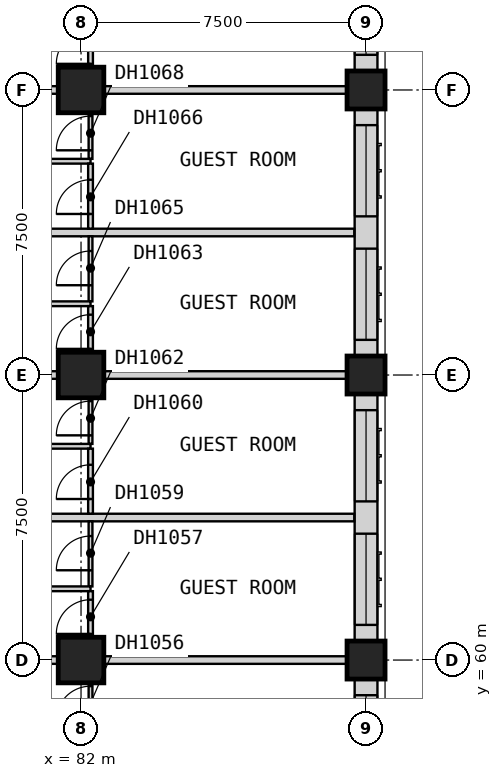
"""IFC4 building model, lengths in metres.
Left out: names, types, materials, properties, quantities, classifications, styles, units other than length and angle.
Written with IfcOpenShell. Run it as: python <this file> out.ifc"""

import sys

from ifc_helpers import new_model, si_unit, direction, frame, frame_2d, origin, origin_2d, place, context, subcontext, project, spatial, rectangle, extrude, element, fill, save


model = new_model("IFC4")
c1 = context("Model", 3, precision=1e-05, world=origin(), true_north=direction((0.0, 1.0)))
c2 = subcontext(c1, "Body", "Model", "MODEL_VIEW")
j1 = project(units=[si_unit("LENGTHUNIT", "METRE"), si_unit("PLANEANGLEUNIT", "RADIAN")], contexts=[c1])
p1 = place(None, origin())
s1 = spatial("IfcSite", under=j1, at=p1, CompositionType="ELEMENT")
p2 = place(p1, origin())
s2 = spatial("IfcBuilding", under=s1, at=p2, CompositionType="ELEMENT")
p3 = place(p2, frame((0.0, 0.0, 48.4)))
s3 = spatial("IfcBuildingStorey", under=s2, at=p3, CompositionType="ELEMENT", Elevation=48.4)
for number, where, z_axis, x_axis in (
    (1, (82.0, 60.0, 0.0), (0.0, 0.0, 1.0), (1.0, 0.0, 0.0)),
    (2, (82.0, 67.5, 0.0), (0.0, 0.0, 1.0), (1.0, 0.0, 0.0)),
    (3, (82.0, 75.0, 0.0), (0.0, 0.0, 1.0), (1.0, 0.0, 0.0)),
):
    element("IfcColumn", number, at=place(p3, frame(where, z_axis=z_axis, x_axis=x_axis)), inside=s3, PredefinedType="COLUMN", context=c2, shape_type="SweptSolid", body=[
        extrude(rectangle(XDim=1.2, YDim=1.2, at=origin_2d()), origin(), (0.0, 0.0, 1.0), 3.6),
    ])
for number, where, z_axis, x_axis in (
    (4, (89.5, 60.0, 0.0), (0.0, 0.0, 1.0), (1.0, 0.0, 0.0)),
    (5, (89.5, 67.5, 0.0), (0.0, 0.0, 1.0), (1.0, 0.0, 0.0)),
    (6, (89.5, 75.0, 0.0), (0.0, 0.0, 1.0), (1.0, 0.0, 0.0)),
):
    element("IfcColumn", number, at=place(p3, frame(where, z_axis=z_axis, x_axis=x_axis)), inside=s3, PredefinedType="COLUMN", context=c2, shape_type="SweptSolid", body=[
        extrude(rectangle(XDim=1.0, YDim=1.0, at=origin_2d()), origin(), (0.0, 0.0, 1.0), 3.6),
    ])
p4 = place(p3, frame((89.5, 53.0, 0.0), z_axis=(0.0, 0.0, 1.0), x_axis=(0.0, 1.0, 0.0)))
e7 = element("IfcWall", 7, at=p4, inside=s3, PredefinedType="SOLIDWALL", context=c2, shape_type="SweptSolid", body=[
    extrude(rectangle(XDim=6.5, YDim=0.6, at=frame_2d((3.25, 0.0))), origin(), (0.0, 0.0, 1.0), 2.85),
])
p5 = place(p4, frame((0.425, 0.0, 0.8)))
e8 = element("IfcOpeningElement", 8, at=p5, cuts=e7, PredefinedType="OPENING", context=c2, shape_type="SweptSolid", body=[
    extrude(rectangle(XDim=2.4, YDim=1.8, at=frame_2d((1.2, 0.9))), frame((0.0, 0.31, 0.0), z_axis=(0.0, -1.0, 0.0), x_axis=(1.0, 0.0, 0.0)), (0.0, 0.0, 1.0), 0.62),
])
p6 = place(p4, frame((3.675, 0.0, 0.8)))
e9 = element("IfcOpeningElement", 9, at=p6, cuts=e7, PredefinedType="OPENING", context=c2, shape_type="SweptSolid", body=[
    extrude(rectangle(XDim=2.4, YDim=1.8, at=frame_2d((1.2, 0.9))), frame((0.0, 0.31, 0.0), z_axis=(0.0, -1.0, 0.0), x_axis=(1.0, 0.0, 0.0)), (0.0, 0.0, 1.0), 0.62),
])
p7 = place(p3, frame((89.5, 60.5, 0.0), z_axis=(0.0, 0.0, 1.0), x_axis=(0.0, 1.0, 0.0)))
e10 = element("IfcWall", 10, at=p7, inside=s3, PredefinedType="SOLIDWALL", context=c2, shape_type="SweptSolid", body=[
    extrude(rectangle(XDim=6.5, YDim=0.6, at=frame_2d((3.25, 0.0))), origin(), (0.0, 0.0, 1.0), 2.85),
])
p8 = place(p7, frame((0.425, 0.0, 0.8)))
e11 = element("IfcOpeningElement", 11, at=p8, cuts=e10, PredefinedType="OPENING", context=c2, shape_type="SweptSolid", body=[
    extrude(rectangle(XDim=2.4, YDim=1.8, at=frame_2d((1.2, 0.9))), frame((0.0, 0.31, 0.0), z_axis=(0.0, -1.0, 0.0), x_axis=(1.0, 0.0, 0.0)), (0.0, 0.0, 1.0), 0.62),
])
p9 = place(p7, frame((3.675, 0.0, 0.8)))
e12 = element("IfcOpeningElement", 12, at=p9, cuts=e10, PredefinedType="OPENING", context=c2, shape_type="SweptSolid", body=[
    extrude(rectangle(XDim=2.4, YDim=1.8, at=frame_2d((1.2, 0.9))), frame((0.0, 0.31, 0.0), z_axis=(0.0, -1.0, 0.0), x_axis=(1.0, 0.0, 0.0)), (0.0, 0.0, 1.0), 0.62),
])
p10 = place(p3, frame((89.5, 68.0, 0.0), z_axis=(0.0, 0.0, 1.0), x_axis=(0.0, 1.0, 0.0)))
e13 = element("IfcWall", 13, at=p10, inside=s3, PredefinedType="SOLIDWALL", context=c2, shape_type="SweptSolid", body=[
    extrude(rectangle(XDim=6.5, YDim=0.6, at=frame_2d((3.25, 0.0))), origin(), (0.0, 0.0, 1.0), 2.85),
])
p11 = place(p10, frame((0.425, 0.0, 0.8)))
e14 = element("IfcOpeningElement", 14, at=p11, cuts=e13, PredefinedType="OPENING", context=c2, shape_type="SweptSolid", body=[
    extrude(rectangle(XDim=2.4, YDim=1.8, at=frame_2d((1.2, 0.9))), frame((0.0, 0.31, 0.0), z_axis=(0.0, -1.0, 0.0), x_axis=(1.0, 0.0, 0.0)), (0.0, 0.0, 1.0), 0.62),
])
p12 = place(p10, frame((3.675, 0.0, 0.8)))
e15 = element("IfcOpeningElement", 15, at=p12, cuts=e13, PredefinedType="OPENING", context=c2, shape_type="SweptSolid", body=[
    extrude(rectangle(XDim=2.4, YDim=1.8, at=frame_2d((1.2, 0.9))), frame((0.0, 0.31, 0.0), z_axis=(0.0, -1.0, 0.0), x_axis=(1.0, 0.0, 0.0)), (0.0, 0.0, 1.0), 0.62),
])
p13 = place(p3, frame((89.5, 75.5, 0.0), z_axis=(0.0, 0.0, 1.0), x_axis=(0.0, 1.0, 0.0)))
e16 = element("IfcWall", 16, at=p13, inside=s3, PredefinedType="SOLIDWALL", context=c2, shape_type="SweptSolid", body=[
    extrude(rectangle(XDim=6.5, YDim=0.6, at=frame_2d((3.25, 0.0))), origin(), (0.0, 0.0, 1.0), 2.85),
])
p14 = place(p13, frame((0.425, 0.0, 0.8)))
e17 = element("IfcOpeningElement", 17, at=p14, cuts=e16, PredefinedType="OPENING", context=c2, shape_type="SweptSolid", body=[
    extrude(rectangle(XDim=2.4, YDim=1.8, at=frame_2d((1.2, 0.9))), frame((0.0, 0.31, 0.0), z_axis=(0.0, -1.0, 0.0), x_axis=(1.0, 0.0, 0.0)), (0.0, 0.0, 1.0), 0.62),
])
p15 = place(p13, frame((3.675, 0.0, 0.8)))
e18 = element("IfcOpeningElement", 18, at=p15, cuts=e16, PredefinedType="OPENING", context=c2, shape_type="SweptSolid", body=[
    extrude(rectangle(XDim=2.4, YDim=1.8, at=frame_2d((1.2, 0.9))), frame((0.0, 0.31, 0.0), z_axis=(0.0, -1.0, 0.0), x_axis=(1.0, 0.0, 0.0)), (0.0, 0.0, 1.0), 0.62),
])
p16 = place(p3, frame((77.475, 60.0, 0.0), z_axis=(0.0, 0.0, 1.0), x_axis=(1.0, 0.0, 0.0)))
e19 = element("IfcWall", 19, at=p16, inside=s3, PredefinedType="PARTITIONING", context=c2, shape_type="SweptSolid", body=[
    extrude(rectangle(XDim=12.525, YDim=0.2, at=frame_2d((6.262, 0.0))), origin(), (0.0, 0.0, 1.0), 3.35),
])
p17 = place(p3, frame((77.475, 63.75, 0.0), z_axis=(0.0, 0.0, 1.0), x_axis=(1.0, 0.0, 0.0)))
e20 = element("IfcWall", 20, at=p17, inside=s3, PredefinedType="PARTITIONING", context=c2, shape_type="SweptSolid", body=[
    extrude(rectangle(XDim=11.715, YDim=0.2, at=frame_2d((5.857, 0.0))), origin(), (0.0, 0.0, 1.0), 3.35),
])
p18 = place(p3, frame((77.475, 67.5, 0.0), z_axis=(0.0, 0.0, 1.0), x_axis=(1.0, 0.0, 0.0)))
e21 = element("IfcWall", 21, at=p18, inside=s3, PredefinedType="PARTITIONING", context=c2, shape_type="SweptSolid", body=[
    extrude(rectangle(XDim=12.525, YDim=0.2, at=frame_2d((6.262, 0.0))), origin(), (0.0, 0.0, 1.0), 3.35),
])
p19 = place(p3, frame((77.475, 71.25, 0.0), z_axis=(0.0, 0.0, 1.0), x_axis=(1.0, 0.0, 0.0)))
e22 = element("IfcWall", 22, at=p19, inside=s3, PredefinedType="PARTITIONING", context=c2, shape_type="SweptSolid", body=[
    extrude(rectangle(XDim=11.715, YDim=0.2, at=frame_2d((5.857, 0.0))), origin(), (0.0, 0.0, 1.0), 3.35),
])
p20 = place(p3, frame((77.475, 75.0, 0.0), z_axis=(0.0, 0.0, 1.0), x_axis=(1.0, 0.0, 0.0)))
e23 = element("IfcWall", 23, at=p20, inside=s3, PredefinedType="PARTITIONING", context=c2, shape_type="SweptSolid", body=[
    extrude(rectangle(XDim=12.525, YDim=0.2, at=frame_2d((6.262, 0.0))), origin(), (0.0, 0.0, 1.0), 3.35),
])
p21 = place(p3, frame((82.25, 58.188, 0.0), z_axis=(0.0, 0.0, 1.0), x_axis=(0.0, 1.0, 0.0)))
e24 = element("IfcWall", 24, at=p21, inside=s3, PredefinedType="PARTITIONING", context=c2, shape_type="SweptSolid", body=[
    extrude(rectangle(XDim=1.712, YDim=0.1, at=frame_2d((0.856, 0.0))), origin(), (0.0, 0.0, 1.0), 3.35),
])
p22 = place(p21, frame((0.225, 0.0, 0.0)))
e25 = element("IfcOpeningElement", 25, at=p22, cuts=e24, PredefinedType="OPENING", context=c2, shape_type="SweptSolid", body=[
    extrude(rectangle(XDim=0.9, YDim=2.1, at=frame_2d((0.45, 1.05))), frame((0.0, 0.06, 0.0), z_axis=(0.0, -1.0, 0.0), x_axis=(1.0, 0.0, 0.0)), (0.0, 0.0, 1.0), 0.12),
])
p23 = place(p3, frame((82.25, 61.938, 0.0), z_axis=(0.0, 0.0, 1.0), x_axis=(0.0, 1.0, 0.0)))
e26 = element("IfcWall", 26, at=p23, inside=s3, PredefinedType="PARTITIONING", context=c2, shape_type="SweptSolid", body=[
    extrude(rectangle(XDim=1.712, YDim=0.1, at=frame_2d((0.856, 0.0))), origin(), (0.0, 0.0, 1.0), 3.35),
])
p24 = place(p23, frame((0.425, 0.0, 0.0)))
e27 = element("IfcOpeningElement", 27, at=p24, cuts=e26, PredefinedType="OPENING", context=c2, shape_type="SweptSolid", body=[
    extrude(rectangle(XDim=0.9, YDim=2.1, at=frame_2d((0.45, 1.05))), frame((0.0, 0.06, 0.0), z_axis=(0.0, -1.0, 0.0), x_axis=(1.0, 0.0, 0.0)), (0.0, 0.0, 1.0), 0.12),
])
p25 = place(p3, frame((82.25, 65.688, 0.0), z_axis=(0.0, 0.0, 1.0), x_axis=(0.0, 1.0, 0.0)))
e28 = element("IfcWall", 28, at=p25, inside=s3, PredefinedType="PARTITIONING", context=c2, shape_type="SweptSolid", body=[
    extrude(rectangle(XDim=1.712, YDim=0.1, at=frame_2d((0.856, 0.0))), origin(), (0.0, 0.0, 1.0), 3.35),
])
p26 = place(p25, frame((0.225, 0.0, 0.0)))
e29 = element("IfcOpeningElement", 29, at=p26, cuts=e28, PredefinedType="OPENING", context=c2, shape_type="SweptSolid", body=[
    extrude(rectangle(XDim=0.9, YDim=2.1, at=frame_2d((0.45, 1.05))), frame((0.0, 0.06, 0.0), z_axis=(0.0, -1.0, 0.0), x_axis=(1.0, 0.0, 0.0)), (0.0, 0.0, 1.0), 0.12),
])
p27 = place(p3, frame((82.25, 69.438, 0.0), z_axis=(0.0, 0.0, 1.0), x_axis=(0.0, 1.0, 0.0)))
e30 = element("IfcWall", 30, at=p27, inside=s3, PredefinedType="PARTITIONING", context=c2, shape_type="SweptSolid", body=[
    extrude(rectangle(XDim=1.712, YDim=0.1, at=frame_2d((0.856, 0.0))), origin(), (0.0, 0.0, 1.0), 3.35),
])
p28 = place(p27, frame((0.425, 0.0, 0.0)))
e31 = element("IfcOpeningElement", 31, at=p28, cuts=e30, PredefinedType="OPENING", context=c2, shape_type="SweptSolid", body=[
    extrude(rectangle(XDim=0.9, YDim=2.1, at=frame_2d((0.45, 1.05))), frame((0.0, 0.06, 0.0), z_axis=(0.0, -1.0, 0.0), x_axis=(1.0, 0.0, 0.0)), (0.0, 0.0, 1.0), 0.12),
])
p29 = place(p3, frame((82.25, 73.188, 0.0), z_axis=(0.0, 0.0, 1.0), x_axis=(0.0, 1.0, 0.0)))
e32 = element("IfcWall", 32, at=p29, inside=s3, PredefinedType="PARTITIONING", context=c2, shape_type="SweptSolid", body=[
    extrude(rectangle(XDim=1.712, YDim=0.1, at=frame_2d((0.856, 0.0))), origin(), (0.0, 0.0, 1.0), 3.35),
])
p30 = place(p29, frame((0.225, 0.0, 0.0)))
e33 = element("IfcOpeningElement", 33, at=p30, cuts=e32, PredefinedType="OPENING", context=c2, shape_type="SweptSolid", body=[
    extrude(rectangle(XDim=0.9, YDim=2.1, at=frame_2d((0.45, 1.05))), frame((0.0, 0.06, 0.0), z_axis=(0.0, -1.0, 0.0), x_axis=(1.0, 0.0, 0.0)), (0.0, 0.0, 1.0), 0.12),
])
for number, where, z_axis, x_axis in (
    (34, (77.475, 61.875, 0.0), (0.0, 0.0, 1.0), (1.0, 0.0, 0.0)),
    (35, (77.475, 65.625, 0.0), (0.0, 0.0, 1.0), (1.0, 0.0, 0.0)),
    (36, (77.475, 69.375, 0.0), (0.0, 0.0, 1.0), (1.0, 0.0, 0.0)),
    (37, (77.475, 73.125, 0.0), (0.0, 0.0, 1.0), (1.0, 0.0, 0.0)),
):
    element("IfcWall", number, at=place(p3, frame(where, z_axis=z_axis, x_axis=x_axis)), inside=s3, PredefinedType="PARTITIONING", context=c2, shape_type="SweptSolid", body=[
        extrude(rectangle(XDim=4.775, YDim=0.125, at=frame_2d((2.387, 0.0))), origin(), (0.0, 0.0, 1.0), 3.35),
    ])
p31 = place(p3, frame((82.25, 60.1, 0.0), z_axis=(0.0, 0.0, 1.0), x_axis=(0.0, 1.0, 0.0)))
e38 = element("IfcWall", 38, at=p31, inside=s3, PredefinedType="PARTITIONING", context=c2, shape_type="SweptSolid", body=[
    extrude(rectangle(XDim=1.712, YDim=0.125, at=frame_2d((0.856, 0.0))), origin(), (0.0, 0.0, 1.0), 3.35),
])
p32 = place(p31, frame((0.587, 0.0, 0.0)))
e39 = element("IfcOpeningElement", 39, at=p32, cuts=e38, PredefinedType="OPENING", context=c2, shape_type="SweptSolid", body=[
    extrude(rectangle(XDim=0.9, YDim=2.1, at=frame_2d((0.45, 1.05))), frame((0.0, 0.073, 0.0), z_axis=(0.0, -1.0, 0.0), x_axis=(1.0, 0.0, 0.0)), (0.0, 0.0, 1.0), 0.145),
])
p33 = place(p3, frame((82.25, 63.85, 0.0), z_axis=(0.0, 0.0, 1.0), x_axis=(0.0, 1.0, 0.0)))
e40 = element("IfcWall", 40, at=p33, inside=s3, PredefinedType="PARTITIONING", context=c2, shape_type="SweptSolid", body=[
    extrude(rectangle(XDim=1.712, YDim=0.125, at=frame_2d((0.856, 0.0))), origin(), (0.0, 0.0, 1.0), 3.35),
])
p34 = place(p33, frame((0.387, 0.0, 0.0)))
e41 = element("IfcOpeningElement", 41, at=p34, cuts=e40, PredefinedType="OPENING", context=c2, shape_type="SweptSolid", body=[
    extrude(rectangle(XDim=0.9, YDim=2.1, at=frame_2d((0.45, 1.05))), frame((0.0, 0.073, 0.0), z_axis=(0.0, -1.0, 0.0), x_axis=(1.0, 0.0, 0.0)), (0.0, 0.0, 1.0), 0.145),
])
p35 = place(p3, frame((82.25, 67.6, 0.0), z_axis=(0.0, 0.0, 1.0), x_axis=(0.0, 1.0, 0.0)))
e42 = element("IfcWall", 42, at=p35, inside=s3, PredefinedType="PARTITIONING", context=c2, shape_type="SweptSolid", body=[
    extrude(rectangle(XDim=1.712, YDim=0.125, at=frame_2d((0.856, 0.0))), origin(), (0.0, 0.0, 1.0), 3.35),
])
p36 = place(p35, frame((0.587, 0.0, 0.0)))
e43 = element("IfcOpeningElement", 43, at=p36, cuts=e42, PredefinedType="OPENING", context=c2, shape_type="SweptSolid", body=[
    extrude(rectangle(XDim=0.9, YDim=2.1, at=frame_2d((0.45, 1.05))), frame((0.0, 0.073, 0.0), z_axis=(0.0, -1.0, 0.0), x_axis=(1.0, 0.0, 0.0)), (0.0, 0.0, 1.0), 0.145),
])
p37 = place(p3, frame((82.25, 71.35, 0.0), z_axis=(0.0, 0.0, 1.0), x_axis=(0.0, 1.0, 0.0)))
e44 = element("IfcWall", 44, at=p37, inside=s3, PredefinedType="PARTITIONING", context=c2, shape_type="SweptSolid", body=[
    extrude(rectangle(XDim=1.712, YDim=0.125, at=frame_2d((0.856, 0.0))), origin(), (0.0, 0.0, 1.0), 3.35),
])
p38 = place(p37, frame((0.387, 0.0, 0.0)))
e45 = element("IfcOpeningElement", 45, at=p38, cuts=e44, PredefinedType="OPENING", context=c2, shape_type="SweptSolid", body=[
    extrude(rectangle(XDim=0.9, YDim=2.1, at=frame_2d((0.45, 1.05))), frame((0.0, 0.073, 0.0), z_axis=(0.0, -1.0, 0.0), x_axis=(1.0, 0.0, 0.0)), (0.0, 0.0, 1.0), 0.145),
])
p39 = place(p3, frame((82.25, 75.1, 0.0), z_axis=(0.0, 0.0, 1.0), x_axis=(0.0, 1.0, 0.0)))
e46 = element("IfcWall", 46, at=p39, inside=s3, PredefinedType="PARTITIONING", context=c2, shape_type="SweptSolid", body=[
    extrude(rectangle(XDim=1.712, YDim=0.125, at=frame_2d((0.856, 0.0))), origin(), (0.0, 0.0, 1.0), 3.35),
])
p40 = place(p39, frame((0.587, 0.0, 0.0)))
e47 = element("IfcOpeningElement", 47, at=p40, cuts=e46, PredefinedType="OPENING", context=c2, shape_type="SweptSolid", body=[
    extrude(rectangle(XDim=0.9, YDim=2.1, at=frame_2d((0.45, 1.05))), frame((0.0, 0.073, 0.0), z_axis=(0.0, -1.0, 0.0), x_axis=(1.0, 0.0, 0.0)), (0.0, 0.0, 1.0), 0.145),
])
p41 = place(p6, origin())
e48 = element("IfcWindow", 48, at=p41, inside=s3, PartitioningType="SINGLE_PANEL", PredefinedType="WINDOW", context=c2, shape_type="SweptSolid", body=[
    extrude(rectangle(XDim=2.4, YDim=1.8, at=frame_2d((1.2, 0.9))), frame((0.0, -0.07, 0.0), z_axis=(0.0, -1.0, 0.0), x_axis=(1.0, 0.0, 0.0)), (0.0, 0.0, 1.0), 0.06),
])
fill(e9, e48)
p42 = place(p8, origin())
e49 = element("IfcWindow", 49, at=p42, inside=s3, PartitioningType="SINGLE_PANEL", PredefinedType="WINDOW", context=c2, shape_type="SweptSolid", body=[
    extrude(rectangle(XDim=2.4, YDim=1.8, at=frame_2d((1.2, 0.9))), frame((0.0, -0.07, 0.0), z_axis=(0.0, -1.0, 0.0), x_axis=(1.0, 0.0, 0.0)), (0.0, 0.0, 1.0), 0.06),
])
fill(e11, e49)
p43 = place(p9, origin())
e50 = element("IfcWindow", 50, at=p43, inside=s3, PartitioningType="SINGLE_PANEL", PredefinedType="WINDOW", context=c2, shape_type="SweptSolid", body=[
    extrude(rectangle(XDim=2.4, YDim=1.8, at=frame_2d((1.2, 0.9))), frame((0.0, -0.07, 0.0), z_axis=(0.0, -1.0, 0.0), x_axis=(1.0, 0.0, 0.0)), (0.0, 0.0, 1.0), 0.06),
])
fill(e12, e50)
p44 = place(p11, origin())
e51 = element("IfcWindow", 51, at=p44, inside=s3, PartitioningType="SINGLE_PANEL", PredefinedType="WINDOW", context=c2, shape_type="SweptSolid", body=[
    extrude(rectangle(XDim=2.4, YDim=1.8, at=frame_2d((1.2, 0.9))), frame((0.0, -0.07, 0.0), z_axis=(0.0, -1.0, 0.0), x_axis=(1.0, 0.0, 0.0)), (0.0, 0.0, 1.0), 0.06),
])
fill(e14, e51)
p45 = place(p12, origin())
e52 = element("IfcWindow", 52, at=p45, inside=s3, PartitioningType="SINGLE_PANEL", PredefinedType="WINDOW", context=c2, shape_type="SweptSolid", body=[
    extrude(rectangle(XDim=2.4, YDim=1.8, at=frame_2d((1.2, 0.9))), frame((0.0, -0.07, 0.0), z_axis=(0.0, -1.0, 0.0), x_axis=(1.0, 0.0, 0.0)), (0.0, 0.0, 1.0), 0.06),
])
fill(e15, e52)
p46 = place(p14, origin())
e53 = element("IfcWindow", 53, at=p46, inside=s3, PartitioningType="SINGLE_PANEL", PredefinedType="WINDOW", context=c2, shape_type="SweptSolid", body=[
    extrude(rectangle(XDim=2.4, YDim=1.8, at=frame_2d((1.2, 0.9))), frame((0.0, -0.07, 0.0), z_axis=(0.0, -1.0, 0.0), x_axis=(1.0, 0.0, 0.0)), (0.0, 0.0, 1.0), 0.06),
])
fill(e17, e53)
p47 = place(p22, origin())
e54 = element("IfcDoor", 54, at=p47, inside=s3, OperationType="SINGLE_SWING_LEFT", PredefinedType="DOOR", context=c2, shape_type="SweptSolid", body=[
    extrude(rectangle(XDim=0.9, YDim=2.1, at=frame_2d((0.45, 1.05))), frame((0.0, 0.025, 0.0), z_axis=(0.0, -1.0, 0.0), x_axis=(1.0, 0.0, 0.0)), (0.0, 0.0, 1.0), 0.05),
])
fill(e25, e54)
p48 = place(p32, origin())
e55 = element("IfcDoor", 55, at=p48, inside=s3, OperationType="SINGLE_SWING_RIGHT", PredefinedType="DOOR", context=c2, shape_type="SweptSolid", body=[
    extrude(rectangle(XDim=0.9, YDim=2.1, at=frame_2d((0.45, 1.05))), frame((0.0, 0.025, 0.0), z_axis=(0.0, -1.0, 0.0), x_axis=(1.0, 0.0, 0.0)), (0.0, 0.0, 1.0), 0.05),
])
fill(e39, e55)
p49 = place(p24, origin())
e56 = element("IfcDoor", 56, at=p49, inside=s3, OperationType="SINGLE_SWING_LEFT", PredefinedType="DOOR", context=c2, shape_type="SweptSolid", body=[
    extrude(rectangle(XDim=0.9, YDim=2.1, at=frame_2d((0.45, 1.05))), frame((0.0, 0.025, 0.0), z_axis=(0.0, -1.0, 0.0), x_axis=(1.0, 0.0, 0.0)), (0.0, 0.0, 1.0), 0.05),
])
fill(e27, e56)
p50 = place(p34, origin())
e57 = element("IfcDoor", 57, at=p50, inside=s3, OperationType="SINGLE_SWING_LEFT", PredefinedType="DOOR", context=c2, shape_type="SweptSolid", body=[
    extrude(rectangle(XDim=0.9, YDim=2.1, at=frame_2d((0.45, 1.05))), frame((0.0, 0.025, 0.0), z_axis=(0.0, -1.0, 0.0), x_axis=(1.0, 0.0, 0.0)), (0.0, 0.0, 1.0), 0.05),
])
fill(e41, e57)
p51 = place(p26, origin())
e58 = element("IfcDoor", 58, at=p51, inside=s3, OperationType="SINGLE_SWING_LEFT", PredefinedType="DOOR", context=c2, shape_type="SweptSolid", body=[
    extrude(rectangle(XDim=0.9, YDim=2.1, at=frame_2d((0.45, 1.05))), frame((0.0, 0.025, 0.0), z_axis=(0.0, -1.0, 0.0), x_axis=(1.0, 0.0, 0.0)), (0.0, 0.0, 1.0), 0.05),
])
fill(e29, e58)
p52 = place(p36, origin())
e59 = element("IfcDoor", 59, at=p52, inside=s3, OperationType="SINGLE_SWING_RIGHT", PredefinedType="DOOR", context=c2, shape_type="SweptSolid", body=[
    extrude(rectangle(XDim=0.9, YDim=2.1, at=frame_2d((0.45, 1.05))), frame((0.0, 0.025, 0.0), z_axis=(0.0, -1.0, 0.0), x_axis=(1.0, 0.0, 0.0)), (0.0, 0.0, 1.0), 0.05),
])
fill(e43, e59)
p53 = place(p28, origin())
e60 = element("IfcDoor", 60, at=p53, inside=s3, OperationType="SINGLE_SWING_LEFT", PredefinedType="DOOR", context=c2, shape_type="SweptSolid", body=[
    extrude(rectangle(XDim=0.9, YDim=2.1, at=frame_2d((0.45, 1.05))), frame((0.0, 0.025, 0.0), z_axis=(0.0, -1.0, 0.0), x_axis=(1.0, 0.0, 0.0)), (0.0, 0.0, 1.0), 0.05),
])
fill(e31, e60)
p54 = place(p38, origin())
e61 = element("IfcDoor", 61, at=p54, inside=s3, OperationType="SINGLE_SWING_LEFT", PredefinedType="DOOR", context=c2, shape_type="SweptSolid", body=[
    extrude(rectangle(XDim=0.9, YDim=2.1, at=frame_2d((0.45, 1.05))), frame((0.0, 0.025, 0.0), z_axis=(0.0, -1.0, 0.0), x_axis=(1.0, 0.0, 0.0)), (0.0, 0.0, 1.0), 0.05),
])
fill(e45, e61)
p55 = place(p30, origin())
e62 = element("IfcDoor", 62, at=p55, inside=s3, OperationType="SINGLE_SWING_LEFT", PredefinedType="DOOR", context=c2, shape_type="SweptSolid", body=[
    extrude(rectangle(XDim=0.9, YDim=2.1, at=frame_2d((0.45, 1.05))), frame((0.0, 0.025, 0.0), z_axis=(0.0, -1.0, 0.0), x_axis=(1.0, 0.0, 0.0)), (0.0, 0.0, 1.0), 0.05),
])
fill(e33, e62)
p56 = place(p40, origin())
e63 = element("IfcDoor", 63, at=p56, inside=s3, OperationType="SINGLE_SWING_RIGHT", PredefinedType="DOOR", context=c2, shape_type="SweptSolid", body=[
    extrude(rectangle(XDim=0.9, YDim=2.1, at=frame_2d((0.45, 1.05))), frame((0.0, 0.025, 0.0), z_axis=(0.0, -1.0, 0.0), x_axis=(1.0, 0.0, 0.0)), (0.0, 0.0, 1.0), 0.05),
])
fill(e47, e63)
save(model, sys.argv[1])
